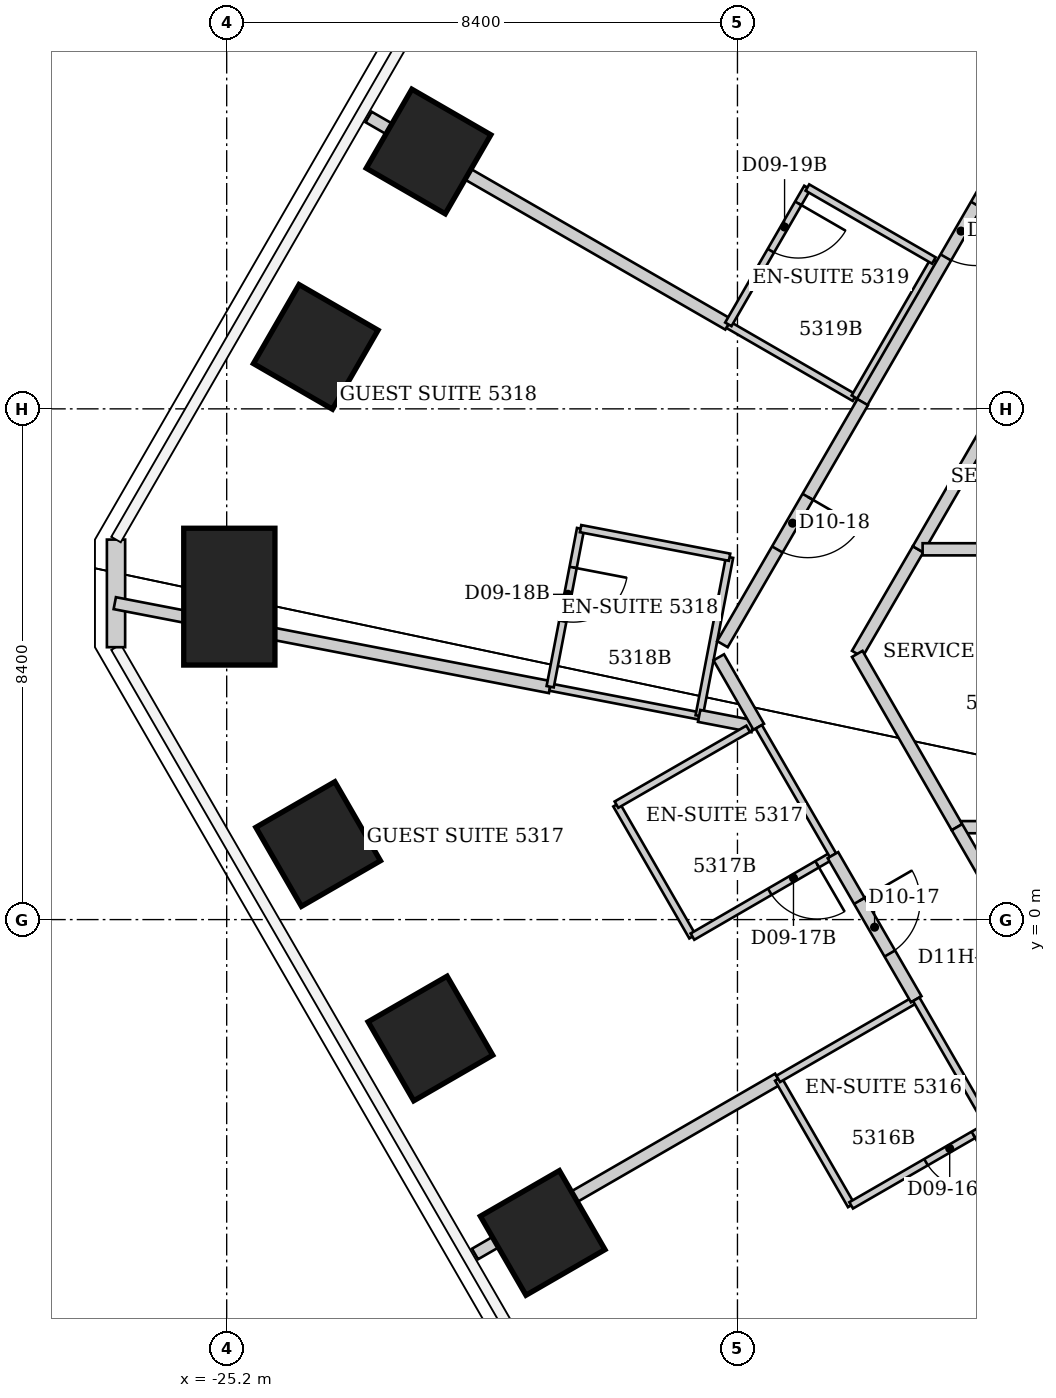
"""IFC4 building model, lengths in metres.
Left out: names, types, materials, properties, quantities, classifications, styles, units other than length and angle.
Written with IfcOpenShell. Run it as: python <this file> out.ifc"""

import sys

from ifc_helpers import new_model, si_unit, direction, frame, frame_2d, origin, origin_2d, place, context, subcontext, project, spatial, rectangle, extrude, element, fill, save


model = new_model("IFC4")
c1 = context("Model", 3, precision=1e-05, world=origin(), true_north=direction((0.0, 1.0)))
c2 = subcontext(c1, "Body", "Model", "MODEL_VIEW")
j1 = project(units=[si_unit("LENGTHUNIT", "METRE"), si_unit("PLANEANGLEUNIT", "RADIAN")], contexts=[c1])
p1 = place(None, origin())
s1 = spatial("IfcSite", under=j1, at=p1, CompositionType="ELEMENT")
p2 = place(p1, origin())
s2 = spatial("IfcBuilding", under=s1, at=p2, CompositionType="ELEMENT")
p3 = place(p2, frame((0.0, 0.0, 213.6)))
s3 = spatial("IfcBuildingStorey", under=s2, at=p3, CompositionType="ELEMENT", Elevation=213.6)
for number, where, z_axis, x_axis in (
    (1, (-20.003, -5.153, 0.0), (0.0, 0.0, 1.0), (-0.866, -0.5, 0.0)),
    (2, (-21.85, -1.956, 0.0), (0.0, 0.0, 1.0), (-0.866, -0.5, 0.0)),
    (3, (-23.696, 1.242, 0.0), (0.0, 0.0, 1.0), (-0.866, -0.5, 0.0)),
):
    element("IfcColumn", number, at=place(p3, frame(where, z_axis=z_axis, x_axis=x_axis)), inside=s3, PredefinedType="COLUMN", context=c2, shape_type="SweptSolid", body=[
        extrude(rectangle(XDim=1.5, YDim=1.5, at=origin_2d()), origin(), (0.0, 0.0, 1.0), 3.8),
    ])
p4 = place(p3, frame((-25.156, 5.311, 0.0), z_axis=(0.0, 0.0, 1.0), x_axis=(-1.0, 0.0, 0.0)))
e4 = element("IfcColumn", 4, at=p4, inside=s3, PredefinedType="COLUMN", context=c2, shape_type="SweptSolid", body=[
    extrude(rectangle(XDim=1.5, YDim=2.25, at=origin_2d()), origin(), (0.0, 0.0, 1.0), 3.8),
])
for number, where, z_axis, x_axis in (
    (5, (-23.735, 9.419, 0.0), (0.0, 0.0, 1.0), (-0.866, 0.5, 0.0)),
    (6, (-21.88, 12.633, 0.0), (0.0, 0.0, 1.0), (-0.866, 0.5, 0.0)),
):
    element("IfcColumn", number, at=place(p3, frame(where, z_axis=z_axis, x_axis=x_axis)), inside=s3, PredefinedType="COLUMN", context=c2, shape_type="SweptSolid", body=[
        extrude(rectangle(XDim=1.5, YDim=1.5, at=origin_2d()), origin(), (0.0, 0.0, 1.0), 3.8),
    ])
p5 = place(p3, frame((-27.02, 4.48, 0.0), z_axis=(0.0, 0.0, 1.0), x_axis=(0.0, 1.0, 0.0)))
e7 = element("IfcWall", 7, at=p5, inside=s3, PredefinedType="SOLIDWALL", context=c2, shape_type="SweptSolid", body=[
    extrude(rectangle(XDim=1.77, YDim=0.3, at=frame_2d((0.885, 0.0))), origin(), (0.0, 0.0, 1.0), 3.64),
])
p6 = place(p3, frame((-27.041, 5.204, 0.0), z_axis=(0.0, 0.0, 1.0), x_axis=(0.981883480928, -0.189485698355, 0.0)))
e8 = element("IfcWall", 8, at=p6, inside=s3, PredefinedType="PARTITIONING", context=c2, shape_type="SweptSolid", body=[
    extrude(rectangle(XDim=7.291, YDim=0.2, at=frame_2d((3.646, 0.0))), origin(), (0.0, 0.0, 1.0), 3.64),
])
p7 = place(p3, frame((-21.116, -5.5, 0.0), z_axis=(0.0, 0.0, 1.0), x_axis=(0.865919350456, 0.50018364478, 0.0)))
e9 = element("IfcWall", 9, at=p7, inside=s3, PredefinedType="PARTITIONING", context=c2, shape_type="SweptSolid", body=[
    extrude(rectangle(XDim=5.758, YDim=0.2, at=frame_2d((2.879, 0.0))), origin(), (0.0, 0.0, 1.0), 3.64),
])
p8 = place(p3, frame((-19.881, 3.823, 0.0), z_axis=(0.0, 0.0, 1.0), x_axis=(0.981896775229, -0.189416796496, 0.0)))
e10 = element("IfcWall", 10, at=p8, inside=s3, PredefinedType="PARTITIONING", context=c2, shape_type="SweptSolid", body=[
    extrude(rectangle(XDim=2.497, YDim=0.12, at=frame_2d((1.248, 0.0))), origin(), (0.0, 0.0, 1.0), 3.64),
])
p9 = place(p3, frame((-19.38, 6.43, 0.0), z_axis=(0.0, 0.0, 1.0), x_axis=(-0.18885765444, -0.982004473696, 0.0)))
e11 = element("IfcWall", 11, at=p9, inside=s3, PredefinedType="PARTITIONING", context=c2, shape_type="SweptSolid", body=[
    extrude(rectangle(XDim=2.647, YDim=0.12, at=frame_2d((1.324, 0.0))), origin(), (0.0, 0.0, 1.0), 3.64),
])
p10 = place(p9, frame((0.65, 0.0, 0.0)))
e12 = element("IfcOpeningElement", 12, at=p10, cuts=e11, PredefinedType="OPENING", context=c2, shape_type="SweptSolid", body=[
    extrude(rectangle(XDim=0.9, YDim=2.03, at=frame_2d((0.45, 1.015))), frame((0.0, 0.06, 0.0), z_axis=(0.0, -1.0, 0.0), x_axis=(1.0, 0.0, 0.0)), (0.0, 0.0, 1.0), 0.12),
])
p11 = place(p3, frame((-18.79, 1.89, 0.0), z_axis=(0.0, 0.0, 1.0), x_axis=(0.499159685399, -0.866510016372, 0.0)))
e13 = element("IfcWall", 13, at=p11, inside=s3, PredefinedType="PARTITIONING", context=c2, shape_type="SweptSolid", body=[
    extrude(rectangle(XDim=2.504, YDim=0.12, at=frame_2d((1.252, 0.0))), origin(), (0.0, 0.0, 1.0), 3.64),
])
p12 = place(p3, frame((-17.54, -0.28, 0.0), z_axis=(0.0, 0.0, 1.0), x_axis=(0.86498992408, 0.501789229896, 0.0)))
e14 = element("IfcWall", 14, at=p12, inside=s3, PredefinedType="PARTITIONING", context=c2, shape_type="SweptSolid", body=[
    extrude(rectangle(XDim=2.671, YDim=0.12, at=frame_2d((1.335, 0.0))), origin(), (0.0, 0.0, 1.0), 3.64),
])
p13 = place(p12, frame((1.47, 0.0, 0.0)))
e15 = element("IfcOpeningElement", 15, at=p13, cuts=e14, PredefinedType="OPENING", context=c2, shape_type="SweptSolid", body=[
    extrude(rectangle(XDim=0.9, YDim=2.03, at=frame_2d((0.45, 1.015))), frame((0.0, 0.06, 0.0), z_axis=(0.0, -1.0, 0.0), x_axis=(1.0, 0.0, 0.0)), (0.0, 0.0, 1.0), 0.12),
])
p14 = place(p3, frame((-17.43, 3.35, 0.0), z_axis=(0.0, 0.0, 1.0), x_axis=(0.188159009227, 0.982138578433, 0.0)))
e16 = element("IfcWall", 16, at=p14, inside=s3, PredefinedType="PARTITIONING", context=c2, shape_type="SweptSolid", body=[
    extrude(rectangle(XDim=2.657, YDim=0.12, at=frame_2d((1.329, 0.0))), origin(), (0.0, 0.0, 1.0), 3.64),
])
p15 = place(p3, frame((-17.43, 3.35, 0.0), z_axis=(0.0, 0.0, 1.0), x_axis=(0.981858463983, -0.189615286052, 0.0)))
e17 = element("IfcWall", 17, at=p15, inside=s3, PredefinedType="PARTITIONING", context=c2, shape_type="SweptSolid", body=[
    extrude(rectangle(XDim=0.896, YDim=0.2, at=frame_2d((0.448, 0.0))), origin(), (0.0, 0.0, 1.0), 3.64),
])
p16 = place(p3, frame((-17.108, 4.314, 0.0), z_axis=(0.0, 0.0, 1.0), x_axis=(0.498488506644, -0.866896307954, 0.0)))
e18 = element("IfcWall", 18, at=p16, inside=s3, PredefinedType="PARTITIONING", context=c2, shape_type="SweptSolid", body=[
    extrude(rectangle(XDim=1.319, YDim=0.2, at=frame_2d((0.66, 0.0))), origin(), (0.0, 0.0, 1.0), 3.64),
])
p17 = place(p3, frame((-16.954, 9.783, 0.0), z_axis=(0.0, 0.0, 1.0), x_axis=(0.865862137391, -0.500282679124, 0.0)))
e19 = element("IfcWall", 19, at=p17, inside=s3, PredefinedType="PARTITIONING", context=c2, shape_type="SweptSolid", body=[
    extrude(rectangle(XDim=2.401, YDim=0.12, at=frame_2d((1.201, 0.0))), origin(), (0.0, 0.0, 1.0), 2.878),
])
p18 = place(p3, frame((-16.95, 9.79, 0.0), z_axis=(0.0, 0.0, 1.0), x_axis=(-0.866371236465, 0.499400521251, 0.0)))
e20 = element("IfcWall", 20, at=p18, inside=s3, PredefinedType="PARTITIONING", context=c2, shape_type="SweptSolid", body=[
    extrude(rectangle(XDim=6.829, YDim=0.2, at=frame_2d((3.414, 0.0))), origin(), (0.0, 0.0, 1.0), 2.878),
])
p19 = place(p3, frame((-16.93, 5.96, 0.0), z_axis=(0.0, 0.0, 1.0), x_axis=(-0.982097071605, 0.18837553436, 0.0)))
e21 = element("IfcWall", 21, at=p19, inside=s3, PredefinedType="PARTITIONING", context=c2, shape_type="SweptSolid", body=[
    extrude(rectangle(XDim=2.495, YDim=0.12, at=frame_2d((1.248, 0.0))), origin(), (0.0, 0.0, 1.0), 3.64),
])
p20 = place(p3, frame((-16.624, 3.138, 0.0), z_axis=(0.0, 0.0, 1.0), x_axis=(-0.866525185869, -0.499133351175, 0.0)))
e22 = element("IfcWall", 22, at=p20, inside=s3, PredefinedType="PARTITIONING", context=c2, shape_type="SweptSolid", body=[
    extrude(rectangle(XDim=2.5, YDim=0.12, at=frame_2d((1.25, 0.0))), origin(), (0.0, 0.0, 1.0), 3.038),
])
p21 = place(p3, frame((-16.45, 3.17, 0.0), z_axis=(0.0, 0.0, 1.0), x_axis=(0.500566296323, -0.865698205488, 0.0)))
e23 = element("IfcWall", 23, at=p21, inside=s3, PredefinedType="PARTITIONING", context=c2, shape_type="SweptSolid", body=[
    extrude(rectangle(XDim=2.437, YDim=0.12, at=frame_2d((1.219, 0.0))), origin(), (0.0, 0.0, 1.0), 3.64),
])
p22 = place(p3, frame((-16.13, -2.62, 0.0), z_axis=(0.0, 0.0, 1.0), x_axis=(0.499737123639, -0.866177122335, 0.0)))
e24 = element("IfcWall", 24, at=p22, inside=s3, PredefinedType="PARTITIONING", context=c2, shape_type="SweptSolid", body=[
    extrude(rectangle(XDim=2.401, YDim=0.12, at=frame_2d((1.201, 0.0))), origin(), (0.0, 0.0, 1.0), 3.64),
])
p23 = place(p3, frame((-16.13, -2.62, 0.0), z_axis=(0.0, 0.0, 1.0), x_axis=(0.866114241029, 0.499846097802, 0.0)))
e25 = element("IfcWall", 25, at=p23, inside=s3, PredefinedType="PARTITIONING", context=c2, shape_type="SweptSolid", body=[
    extrude(rectangle(XDim=2.621, YDim=0.12, at=frame_2d((1.311, 0.0))), origin(), (0.0, 0.0, 1.0), 3.64),
])
p24 = place(p3, frame((-15.65, 12.04, 0.0), z_axis=(0.0, 0.0, 1.0), x_axis=(-0.500291685314, -0.865856933682, 0.0)))
e26 = element("IfcWall", 26, at=p24, inside=s3, PredefinedType="PARTITIONING", context=c2, shape_type="SweptSolid", body=[
    extrude(rectangle(XDim=2.599, YDim=0.12, at=frame_2d((1.299, 0.0))), origin(), (0.0, 0.0, 1.0), 3.64),
])
p25 = place(p24, frame((0.3, 0.0, 0.0)))
e27 = element("IfcOpeningElement", 27, at=p25, cuts=e26, PredefinedType="OPENING", context=c2, shape_type="SweptSolid", body=[
    extrude(rectangle(XDim=0.9, YDim=2.03, at=frame_2d((0.45, 1.015))), frame((0.0, 0.06, 0.0), z_axis=(0.0, -1.0, 0.0), x_axis=(1.0, 0.0, 0.0)), (0.0, 0.0, 1.0), 0.12),
])
p26 = place(p3, frame((-15.23, 1.06, 0.0), z_axis=(0.0, 0.0, 1.0), x_axis=(0.500406860043, -0.865790375565, 0.0)))
e28 = element("IfcWall", 28, at=p26, inside=s3, PredefinedType="PARTITIONING", context=c2, shape_type="SweptSolid", body=[
    extrude(rectangle(XDim=2.738, YDim=0.2, at=frame_2d((1.369, 0.0))), origin(), (0.0, 0.0, 1.0), 3.64),
])
p27 = place(p26, frame((0.869, 0.0, 0.0)))
e29 = element("IfcOpeningElement", 29, at=p27, cuts=e28, PredefinedType="OPENING", context=c2, shape_type="SweptSolid", body=[
    extrude(rectangle(XDim=1.0, YDim=2.13, at=frame_2d((0.5, 1.065))), frame((0.0, 0.1, 0.0), z_axis=(0.0, -1.0, 0.0), x_axis=(1.0, 0.0, 0.0)), (0.0, 0.0, 1.0), 0.2),
])
p28 = place(p3, frame((-14.93, -4.7, 0.0), z_axis=(0.0, 0.0, 1.0), x_axis=(0.866114241029, 0.499846097802, 0.0)))
e30 = element("IfcWall", 30, at=p28, inside=s3, PredefinedType="PARTITIONING", context=c2, shape_type="SweptSolid", body=[
    extrude(rectangle(XDim=2.621, YDim=0.12, at=frame_2d((1.311, 0.0))), origin(), (0.0, 0.0, 1.0), 3.64),
])
p29 = place(p28, frame((1.421, 0.0, 0.0)))
e31 = element("IfcOpeningElement", 31, at=p29, cuts=e30, PredefinedType="OPENING", context=c2, shape_type="SweptSolid", body=[
    extrude(rectangle(XDim=0.9, YDim=2.03, at=frame_2d((0.45, 1.015))), frame((0.0, 0.06, 0.0), z_axis=(0.0, -1.0, 0.0), x_axis=(1.0, 0.0, 0.0)), (0.0, 0.0, 1.0), 0.12),
])
p30 = place(p3, frame((-14.87, 8.59, 0.0), z_axis=(0.0, 0.0, 1.0), x_axis=(0.500291685314, 0.865856933682, 0.0)))
e32 = element("IfcWall", 32, at=p30, inside=s3, PredefinedType="PARTITIONING", context=c2, shape_type="SweptSolid", body=[
    extrude(rectangle(XDim=2.599, YDim=0.12, at=frame_2d((1.299, 0.0))), origin(), (0.0, 0.0, 1.0), 3.64),
])
p31 = place(p3, frame((-14.83, 4.37, 0.0), z_axis=(0.0, 0.0, 1.0), x_axis=(0.502626855825, 0.864503466623, 0.0)))
e33 = element("IfcWall", 33, at=p31, inside=s3, PredefinedType="PARTITIONING", context=c2, shape_type="SweptSolid", body=[
    extrude(rectangle(XDim=1.99, YDim=0.2, at=frame_2d((0.995, 0.0))), origin(), (0.0, 0.0, 1.0), 3.64),
])
p32 = place(p3, frame((-14.827, 8.554, 0.0), z_axis=(0.0, 0.0, 1.0), x_axis=(0.865865073245, -0.500277597875, 0.0)))
e34 = element("IfcWall", 34, at=p32, inside=s3, PredefinedType="PARTITIONING", context=c2, shape_type="SweptSolid", body=[
    extrude(rectangle(XDim=0.089, YDim=0.2, at=frame_2d((0.044, 0.0))), origin(), (0.0, 0.0, 1.0), 3.64),
])
p33 = place(p3, frame((-14.75, 8.51, 0.0), z_axis=(0.0, 0.0, 1.0), x_axis=(0.500618647881, 0.86566793252, 0.0)))
e35 = element("IfcWall", 35, at=p33, inside=s3, PredefinedType="PARTITIONING", context=c2, shape_type="SweptSolid", body=[
    extrude(rectangle(XDim=4.794, YDim=0.2, at=frame_2d((2.397, 0.0))), origin(), (0.0, 0.0, 1.0), 3.64),
])
p34 = place(p33, frame((2.75, 0.0, 0.0)))
e36 = element("IfcOpeningElement", 36, at=p34, cuts=e35, PredefinedType="OPENING", context=c2, shape_type="SweptSolid", body=[
    extrude(rectangle(XDim=1.0, YDim=2.13, at=frame_2d((0.5, 1.065))), frame((0.0, 0.1, 0.0), z_axis=(0.0, -1.0, 0.0), x_axis=(1.0, 0.0, 0.0)), (0.0, 0.0, 1.0), 0.2),
])
p35 = place(p3, frame((-14.74, 8.51, 0.0), z_axis=(0.0, 0.0, 1.0), x_axis=(-0.501513165407, -0.865150012959, 0.0)))
e37 = element("IfcWall", 37, at=p35, inside=s3, PredefinedType="PARTITIONING", context=c2, shape_type="SweptSolid", body=[
    extrude(rectangle(XDim=4.6, YDim=0.2, at=frame_2d((2.3, 0.0))), origin(), (0.0, 0.0, 1.0), 3.64),
])
p36 = place(p35, frame((1.8, 0.0, 0.0)))
e38 = element("IfcOpeningElement", 38, at=p36, cuts=e37, PredefinedType="OPENING", context=c2, shape_type="SweptSolid", body=[
    extrude(rectangle(XDim=1.0, YDim=2.13, at=frame_2d((0.5, 1.065))), frame((0.0, 0.1, 0.0), z_axis=(0.0, -1.0, 0.0), x_axis=(1.0, 0.0, 0.0)), (0.0, 0.0, 1.0), 0.2),
])
p37 = place(p3, frame((-13.86, -1.31, 0.0), z_axis=(0.0, 0.0, 1.0), x_axis=(0.499813401482, -0.866133109688, 0.0)))
e39 = element("IfcWall", 39, at=p37, inside=s3, PredefinedType="PARTITIONING", context=c2, shape_type="SweptSolid", body=[
    extrude(rectangle(XDim=2.401, YDim=0.12, at=frame_2d((1.201, 0.0))), origin(), (0.0, 0.0, 1.0), 3.64),
])
p38 = place(p3, frame((-13.83, 6.09, 0.0), z_axis=(0.0, 0.0, 1.0), x_axis=(0.500248310865, 0.865881993967, 0.0)))
e40 = element("IfcWall", 40, at=p38, inside=s3, PredefinedType="PARTITIONING", context=c2, shape_type="SweptSolid", body=[
    extrude(rectangle(XDim=5.278, YDim=0.2, at=frame_2d((2.639, 0.0))), origin(), (0.0, 0.0, 1.0), 3.64),
])
p39 = place(p3, frame((-13.755, 6.09, 0.0), z_axis=(0.0, 0.0, 1.0), x_axis=(1.0, 0.0, 0.0)))
e41 = element("IfcWall", 41, at=p39, inside=s3, PredefinedType="PARTITIONING", context=c2, shape_type="SweptSolid", body=[
    extrude(rectangle(XDim=3.195, YDim=0.2, at=frame_2d((1.597, 0.0))), origin(), (0.0, 0.0, 1.0), 3.64),
])
p40 = place(p3, frame((-13.57, 10.84, 0.0), z_axis=(0.0, 0.0, 1.0), x_axis=(-0.866177122335, 0.499737123639, 0.0)))
e42 = element("IfcWall", 42, at=p40, inside=s3, PredefinedType="PARTITIONING", context=c2, shape_type="SweptSolid", body=[
    extrude(rectangle(XDim=2.401, YDim=0.12, at=frame_2d((1.201, 0.0))), origin(), (0.0, 0.0, 1.0), 3.64),
])
p41 = place(p3, frame((-13.19, 1.52, 0.0), z_axis=(0.0, 0.0, 1.0), x_axis=(-0.498775186059, 0.866731396554, 0.0)))
e43 = element("IfcWall", 43, at=p41, inside=s3, PredefinedType="PARTITIONING", context=c2, shape_type="SweptSolid", body=[
    extrude(rectangle(XDim=3.288, YDim=0.2, at=frame_2d((1.644, 0.0))), origin(), (0.0, 0.0, 1.0), 3.64),
])
p42 = place(p3, frame((-11.029, 12.74, 0.0), z_axis=(0.0, 0.0, 1.0), x_axis=(-0.654429261747, 0.756123231603, 0.0)))
e44 = element("IfcWall", 44, at=p42, inside=s3, PredefinedType="PARTITIONING", context=c2, shape_type="SweptSolid", body=[
    extrude(rectangle(XDim=10.683, YDim=0.2, at=frame_2d((5.342, 0.0))), origin(), (0.0, 0.0, 1.0), 3.64),
])
p43 = place(p3, frame((-10.56, 1.52, 0.0), z_axis=(0.0, 0.0, 1.0), x_axis=(-1.0, 0.0, 0.0)))
e45 = element("IfcWall", 45, at=p43, inside=s3, PredefinedType="PARTITIONING", context=c2, shape_type="SweptSolid", body=[
    extrude(rectangle(XDim=2.56, YDim=0.2, at=frame_2d((1.28, 0.0))), origin(), (0.0, 0.0, 1.0), 3.64),
])
p44 = place(p3, frame((-10.55, -3.05, 0.0), z_axis=(0.0, 0.0, 1.0), x_axis=(-0.500193590286, 0.865913605527, 0.0)))
e46 = element("IfcWall", 46, at=p44, inside=s3, PredefinedType="PARTITIONING", context=c2, shape_type="SweptSolid", body=[
    extrude(rectangle(XDim=5.278, YDim=0.2, at=frame_2d((2.639, 0.0))), origin(), (0.0, 0.0, 1.0), 3.64),
])
p45 = place(p44, frame((2.25, 0.0, 0.0)))
e47 = element("IfcOpeningElement", 47, at=p45, cuts=e46, PredefinedType="OPENING", context=c2, shape_type="SweptSolid", body=[
    extrude(rectangle(XDim=1.1, YDim=2.2, at=frame_2d((0.55, 1.1))), frame((0.0, 0.1, 0.0), z_axis=(0.0, -1.0, 0.0), x_axis=(1.0, 0.0, 0.0)), (0.0, 0.0, 1.0), 0.2),
])
p46 = place(p29, origin())
e48 = element("IfcDoor", 48, at=p46, inside=s3, OperationType="SINGLE_SWING_RIGHT", PredefinedType="DOOR", context=c2, shape_type="SweptSolid", body=[
    extrude(rectangle(XDim=0.9, YDim=2.03, at=frame_2d((0.45, 1.015))), frame((0.0, 0.025, 0.0), z_axis=(0.0, -1.0, 0.0), x_axis=(1.0, 0.0, 0.0)), (0.0, 0.0, 1.0), 0.05),
])
fill(e31, e48)
p47 = place(p27, origin())
e49 = element("IfcDoor", 49, at=p47, inside=s3, OperationType="SINGLE_SWING_LEFT", PredefinedType="DOOR", context=c2, shape_type="SweptSolid", body=[
    extrude(rectangle(XDim=1.0, YDim=2.13, at=frame_2d((0.5, 1.065))), frame((0.0, 0.025, 0.0), z_axis=(0.0, -1.0, 0.0), x_axis=(1.0, 0.0, 0.0)), (0.0, 0.0, 1.0), 0.05),
])
fill(e29, e49)
p48 = place(p13, origin())
e50 = element("IfcDoor", 50, at=p48, inside=s3, OperationType="SINGLE_SWING_RIGHT", PredefinedType="DOOR", context=c2, shape_type="SweptSolid", body=[
    extrude(rectangle(XDim=0.9, YDim=2.03, at=frame_2d((0.45, 1.015))), frame((0.0, 0.025, 0.0), z_axis=(0.0, -1.0, 0.0), x_axis=(1.0, 0.0, 0.0)), (0.0, 0.0, 1.0), 0.05),
])
fill(e15, e50)
p49 = place(p36, origin())
e51 = element("IfcDoor", 51, at=p49, inside=s3, OperationType="SINGLE_SWING_LEFT", PredefinedType="DOOR", context=c2, shape_type="SweptSolid", body=[
    extrude(rectangle(XDim=1.0, YDim=2.13, at=frame_2d((0.5, 1.065))), frame((0.0, 0.025, 0.0), z_axis=(0.0, -1.0, 0.0), x_axis=(1.0, 0.0, 0.0)), (0.0, 0.0, 1.0), 0.05),
])
fill(e38, e51)
p50 = place(p10, origin())
e52 = element("IfcDoor", 52, at=p50, inside=s3, OperationType="SINGLE_SWING_LEFT", PredefinedType="DOOR", context=c2, shape_type="SweptSolid", body=[
    extrude(rectangle(XDim=0.9, YDim=2.03, at=frame_2d((0.45, 1.015))), frame((0.0, 0.025, 0.0), z_axis=(0.0, -1.0, 0.0), x_axis=(1.0, 0.0, 0.0)), (0.0, 0.0, 1.0), 0.05),
])
fill(e12, e52)
p51 = place(p34, origin())
e53 = element("IfcDoor", 53, at=p51, inside=s3, OperationType="SINGLE_SWING_RIGHT", PredefinedType="DOOR", context=c2, shape_type="SweptSolid", body=[
    extrude(rectangle(XDim=1.0, YDim=2.13, at=frame_2d((0.5, 1.065))), frame((0.0, 0.025, 0.0), z_axis=(0.0, -1.0, 0.0), x_axis=(1.0, 0.0, 0.0)), (0.0, 0.0, 1.0), 0.05),
])
fill(e36, e53)
p52 = place(p25, origin())
e54 = element("IfcDoor", 54, at=p52, inside=s3, OperationType="SINGLE_SWING_LEFT", PredefinedType="DOOR", context=c2, shape_type="SweptSolid", body=[
    extrude(rectangle(XDim=0.9, YDim=2.03, at=frame_2d((0.45, 1.015))), frame((0.0, 0.025, 0.0), z_axis=(0.0, -1.0, 0.0), x_axis=(1.0, 0.0, 0.0)), (0.0, 0.0, 1.0), 0.05),
])
fill(e27, e54)
save(model, sys.argv[1])
